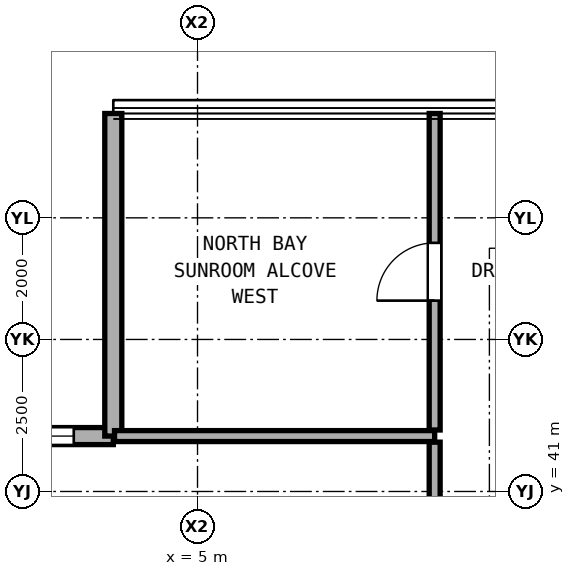
"""IFC4 building model, lengths in metres.
Left out: names, types, materials, properties, quantities, classifications, styles, units other than length and angle.
Written with IfcOpenShell. Run it as: python <this file> out.ifc"""

import sys

from ifc_helpers import new_model, si_unit, direction, frame, frame_2d, origin, place, context, subcontext, project, spatial, rectangle, extrude, element, fill, save


model = new_model("IFC4")
c1 = context("Model", 3, precision=1e-05, world=origin(), true_north=direction((0.0, 1.0)))
c2 = subcontext(c1, "Body", "Model", "MODEL_VIEW")
j1 = project(units=[si_unit("LENGTHUNIT", "METRE"), si_unit("PLANEANGLEUNIT", "RADIAN")], contexts=[c1])
p1 = place(None, origin())
s1 = spatial("IfcSite", under=j1, at=p1, CompositionType="ELEMENT")
p2 = place(p1, origin())
s2 = spatial("IfcBuilding", under=s1, at=p2, CompositionType="ELEMENT")
p3 = place(p2, frame((0.0, 0.0, 111.5)))
s3 = spatial("IfcBuildingStorey", under=s2, at=p3, CompositionType="ELEMENT", Elevation=111.5)
p4 = place(p3, frame((3.615, 41.911, 0.0), z_axis=(0.0, 0.0, 1.0), x_axis=(-1.0, 0.0, 0.0)))
e1 = element("IfcWall", 1, at=p4, inside=s3, PredefinedType="SOLIDWALL", context=c2, shape_type="SweptSolid", body=[
    extrude(rectangle(XDim=5.305, YDim=0.28, at=frame_2d((2.652, 0.0))), origin(), (0.0, 0.0, 1.0), 3.06),
])
p5 = place(p4, frame((0.65, 0.0, 0.85)))
e2 = element("IfcOpeningElement", 2, at=p5, cuts=e1, PredefinedType="OPENING", context=c2, shape_type="SweptSolid", body=[
    extrude(rectangle(XDim=1.1, YDim=2.0, at=frame_2d((0.55, 1.0))), frame((0.0, 0.15, 0.0), z_axis=(0.0, -1.0, 0.0), x_axis=(1.0, 0.0, 0.0)), (0.0, 0.0, 1.0), 0.3),
])
p6 = place(p3, frame((3.615, 47.216, 0.0), z_axis=(0.0, 0.0, 1.0), x_axis=(0.0, -1.0, 0.0)))
e3 = element("IfcWall", 3, at=p6, inside=s3, PredefinedType="SOLIDWALL", context=c2, shape_type="SweptSolid", body=[
    extrude(rectangle(XDim=5.305, YDim=0.28, at=frame_2d((2.653, 0.0))), origin(), (0.0, 0.0, 1.0), 3.06),
])
p7 = place(p3, frame((3.635, 41.911, 0.0), z_axis=(0.0, 0.0, 1.0), x_axis=(1.0, 0.0, 0.0)))
e4 = element("IfcWall", 4, at=p7, inside=s3, PredefinedType="PARTITIONING", context=c2, shape_type="SweptSolid", body=[
    extrude(rectangle(XDim=5.265, YDim=0.18, at=frame_2d((2.632, 0.0))), origin(), (0.0, 0.0, 1.0), 3.08),
])
p8 = place(p3, frame((8.9, 34.695, 0.0), z_axis=(0.0, 0.0, 1.0), x_axis=(0.0, 1.0, 0.0)))
e5 = element("IfcWall", 5, at=p8, inside=s3, PredefinedType="PARTITIONING", context=c2, shape_type="SweptSolid", body=[
    extrude(rectangle(XDim=7.116, YDim=0.18, at=frame_2d((3.558, 0.0))), origin(), (0.0, 0.0, 1.0), 2.456),
])
p9 = place(p8, frame((3.033, 0.0, 0.0)))
e6 = element("IfcOpeningElement", 6, at=p9, cuts=e5, PredefinedType="OPENING", context=c2, shape_type="SweptSolid", body=[
    extrude(rectangle(XDim=1.05, YDim=2.2, at=frame_2d((0.525, 1.1))), frame((0.0, 0.1, 0.0), z_axis=(0.0, -1.0, 0.0), x_axis=(1.0, 0.0, 0.0)), (0.0, 0.0, 1.0), 0.2),
])
p10 = place(p3, frame((8.9, 42.011, 0.0), z_axis=(0.0, 0.0, 1.0), x_axis=(0.0, 1.0, 0.0)))
e7 = element("IfcWall", 7, at=p10, inside=s3, PredefinedType="PARTITIONING", context=c2, shape_type="SweptSolid", body=[
    extrude(rectangle(XDim=5.205, YDim=0.18, at=frame_2d((2.603, 0.0))), origin(), (0.0, 0.0, 1.0), 3.08),
])
p11 = place(p10, frame((2.127, 0.0, 0.0)))
e8 = element("IfcOpeningElement", 8, at=p11, cuts=e7, PredefinedType="OPENING", context=c2, shape_type="SweptSolid", body=[
    extrude(rectangle(XDim=0.95, YDim=2.15, at=frame_2d((0.475, 1.075))), frame((0.0, 0.1, 0.0), z_axis=(0.0, -1.0, 0.0), x_axis=(1.0, 0.0, 0.0)), (0.0, 0.0, 1.0), 0.2),
])
p12 = place(p5, origin())
e9 = element("IfcWindow", 9, at=p12, inside=s3, PartitioningType="SINGLE_PANEL", PredefinedType="WINDOW", context=c2, shape_type="SweptSolid", body=[
    extrude(rectangle(XDim=1.1, YDim=2.0, at=frame_2d((0.55, 1.0))), frame((0.0, 0.03, 0.0), z_axis=(0.0, -1.0, 0.0), x_axis=(1.0, 0.0, 0.0)), (0.0, 0.0, 1.0), 0.06),
])
fill(e2, e9)
p13 = place(p11, origin())
e10 = element("IfcDoor", 10, at=p13, inside=s3, OperationType="SINGLE_SWING_LEFT", PredefinedType="DOOR", context=c2, shape_type="SweptSolid", body=[
    extrude(rectangle(XDim=0.95, YDim=2.15, at=frame_2d((0.475, 1.075))), frame((0.0, 0.025, 0.0), z_axis=(0.0, -1.0, 0.0), x_axis=(1.0, 0.0, 0.0)), (0.0, 0.0, 1.0), 0.05),
])
fill(e8, e10)
save(model, sys.argv[1])
